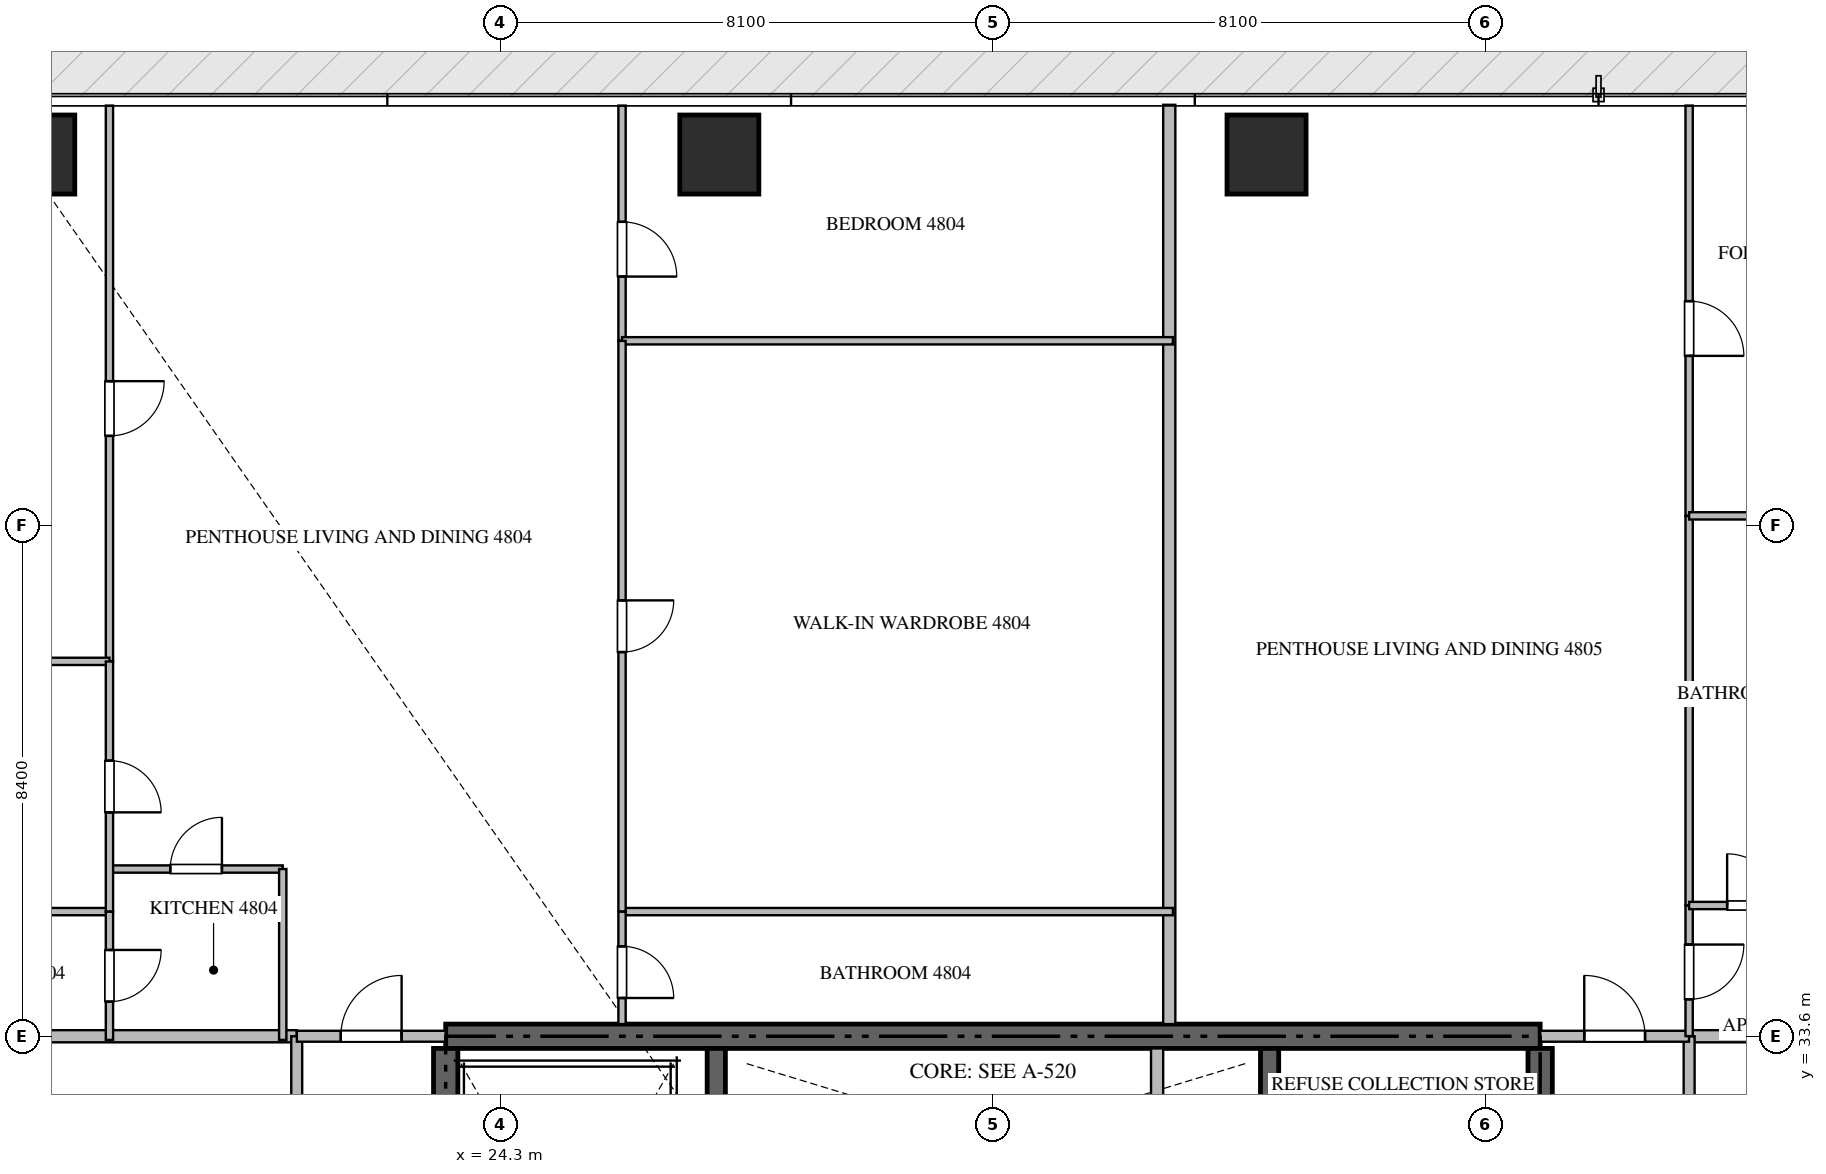
"""IFC4 building model, lengths in metres.
Left out: names, types, materials, properties, quantities, classifications, styles, units other than length and angle.
Written with IfcOpenShell. Run it as: python <this file> out.ifc"""

import sys

from ifc_helpers import new_model, si_unit, direction, frame, frame_2d, origin, origin_2d, place, context, subcontext, project, spatial, rectangle, extrude, source, transform, mapped, element, fill, save


model = new_model("IFC4")
c1 = context("Model", 3, precision=1e-05, world=origin(), true_north=direction((0.0, 1.0)))
c2 = subcontext(c1, "Body", "Model", "MODEL_VIEW")
j1 = project(units=[si_unit("LENGTHUNIT", "METRE"), si_unit("PLANEANGLEUNIT", "RADIAN")], contexts=[c1])
p1 = place(None, origin())
s1 = spatial("IfcSite", under=j1, at=p1, CompositionType="ELEMENT")
p2 = place(p1, origin())
s2 = spatial("IfcBuilding", under=s1, at=p2, CompositionType="ELEMENT")
p3 = place(p2, frame((0.0, 0.0, 191.4)))
s3 = spatial("IfcBuildingStorey", under=s2, at=p3, CompositionType="ELEMENT", Elevation=191.4)
p4 = place(p3, frame((41.4, 33.6, -0.26), z_axis=(0.0, 0.0, 1.0), x_axis=(-1.0, 0.0, 0.0)))
e1 = element("IfcWall", 1, at=p4, inside=s3, PredefinedType="SHEAR", context=c2, shape_type="SweptSolid", body=[
    extrude(rectangle(XDim=18.0, YDim=0.4, at=frame_2d((9.0, 0.0))), origin(), (0.0, 0.0, 1.0), 3.748),
])
p5 = place(p3, frame((23.4, 24.25, -0.26), z_axis=(0.0, 0.0, 1.0), x_axis=(0.0, 1.0, 0.0)))
e2 = element("IfcWall", 2, at=p5, inside=s3, PredefinedType="SHEAR", context=c2, shape_type="SweptSolid", body=[
    extrude(rectangle(XDim=9.15, YDim=0.4, at=frame_2d((4.575, 0.0))), origin(), (0.0, 0.0, 1.0), 3.748),
])
p6 = place(p3, frame((41.4, 27.75, -0.26), z_axis=(0.0, 0.0, 1.0), x_axis=(0.0, 1.0, 0.0)))
e3 = element("IfcWall", 3, at=p6, inside=s3, PredefinedType="SHEAR", context=c2, shape_type="SweptSolid", body=[
    extrude(rectangle(XDim=5.65, YDim=0.4, at=frame_2d((2.825, 0.0))), origin(), (0.0, 0.0, 1.0), 3.748),
])
p7 = place(p3, frame((27.85, 23.55, -0.26), z_axis=(0.0, 0.0, 1.0), x_axis=(0.0, 1.0, 0.0)))
e4 = element("IfcWall", 4, at=p7, inside=s3, PredefinedType="SHEAR", context=c2, shape_type="SweptSolid", body=[
    extrude(rectangle(XDim=9.85, YDim=0.3, at=frame_2d((4.925, 0.0))), origin(), (0.0, 0.0, 1.0), 3.748),
])
p8 = place(p3, frame((36.95, 27.05, -0.26), z_axis=(0.0, 0.0, 1.0), x_axis=(0.0, 1.0, 0.0)))
e5 = element("IfcWall", 5, at=p8, inside=s3, PredefinedType="SHEAR", context=c2, shape_type="SweptSolid", body=[
    extrude(rectangle(XDim=6.35, YDim=0.3, at=frame_2d((3.175, 0.0))), origin(), (0.0, 0.0, 1.0), 3.748),
])
m1 = source(origin(), c2, "Body", "SweptSolid", [
    extrude(rectangle(XDim=1.3, YDim=1.3, at=origin_2d()), origin(), (0.0, 0.0, 1.0), 3.75),
])
for number, where, z_axis, x_axis in (
    (6, (16.65, 48.1, -0.26), (0.0, 0.0, 1.0), (1.0, 0.0, 0.0)),
    (7, (27.9, 48.1, -0.26), (0.0, 0.0, 1.0), (1.0, 0.0, 0.0)),
    (8, (36.9, 48.1, -0.26), (0.0, 0.0, 1.0), (1.0, 0.0, 0.0)),
):
    element("IfcColumn", number, at=place(p3, frame(where, z_axis=z_axis, x_axis=x_axis)), inside=s3, PredefinedType="COLUMN", context=c2, shape_type="MappedRepresentation", body=[
        mapped(m1, transform((0.0, 0.0, 0.0), scale=1.0)),
    ])
p9 = place(p3, frame((35.1, 30.75, 0.0), z_axis=(0.0, 0.0, 1.0), x_axis=(0.0, 1.0, 0.0)))
e9 = element("IfcWall", 9, at=p9, inside=s3, PredefinedType="STANDARD", context=c2, shape_type="SweptSolid", body=[
    extrude(rectangle(XDim=2.65, YDim=0.2, at=frame_2d((1.325, 0.0))), origin(), (0.0, 0.0, 1.0), 3.49),
])
p10 = place(p3, frame((35.3, 33.8, 0.0), z_axis=(0.0, 0.0, 1.0), x_axis=(0.0, 1.0, 0.0)))
e10 = element("IfcWall", 10, at=p10, inside=s3, PredefinedType="PARTITIONING", context=c2, shape_type="SweptSolid", body=[
    extrude(rectangle(XDim=15.118, YDim=0.2, at=frame_2d((7.559, 0.0))), origin(), (0.0, 0.0, 1.0), 3.49),
])
for number, where, z_axis, x_axis in (
    (11, (7.882, 33.6, 0.0), (0.0, 0.0, 1.0), (1.0, 0.0, 0.0)),
    (12, (43.85, 33.6, 0.0), (0.0, 0.0, 1.0), (1.0, 0.0, 0.0)),
):
    element("IfcWall", number, at=place(p3, frame(where, z_axis=z_axis, x_axis=x_axis)), inside=s3, PredefinedType="PARTITIONING", context=c2, shape_type="SweptSolid", body=[
        extrude(rectangle(XDim=13.068, YDim=0.2, at=frame_2d((6.534, 0.0))), origin(), (0.0, 0.0, 1.0), 3.49),
    ])
p11 = place(p3, frame((20.95, 14.9, 0.0), z_axis=(0.0, 0.0, 1.0), x_axis=(0.0, 1.0, 0.0)))
e13 = element("IfcWall", 13, at=p11, inside=s3, PredefinedType="PARTITIONING", context=c2, shape_type="SweptSolid", body=[
    extrude(rectangle(XDim=18.7, YDim=0.18, at=frame_2d((9.35, 0.0))), origin(), (0.0, 0.0, 1.0), 3.49),
])
p12 = place(p11, frame((14.603, 0.0, 0.0)))
e14 = element("IfcOpeningElement", 14, at=p12, cuts=e13, PredefinedType="OPENING", context=c2, shape_type="SweptSolid", body=[
    extrude(rectangle(XDim=1.0, YDim=2.15, at=frame_2d((0.5, 1.075))), frame((0.0, 0.1, 0.0), z_axis=(0.0, -1.0, 0.0), x_axis=(1.0, 0.0, 0.0)), (0.0, 0.0, 1.0), 0.2),
])
p13 = place(p3, frame((43.85, 14.9, 0.0), z_axis=(0.0, 0.0, 1.0), x_axis=(0.0, 1.0, 0.0)))
e15 = element("IfcWall", 15, at=p13, inside=s3, PredefinedType="PARTITIONING", context=c2, shape_type="SweptSolid", body=[
    extrude(rectangle(XDim=18.7, YDim=0.18, at=frame_2d((9.35, 0.0))), origin(), (0.0, 0.0, 1.0), 3.49),
])
p14 = place(p13, frame((1.805, 0.0, 0.0)))
e16 = element("IfcOpeningElement", 16, at=p14, cuts=e15, PredefinedType="OPENING", context=c2, shape_type="SweptSolid", body=[
    extrude(rectangle(XDim=1.0, YDim=2.15, at=frame_2d((0.5, 1.075))), frame((0.0, 0.1, 0.0), z_axis=(0.0, -1.0, 0.0), x_axis=(1.0, 0.0, 0.0)), (0.0, 0.0, 1.0), 0.2),
])
p15 = place(p3, frame((20.952, 33.6, 0.0), z_axis=(0.0, 0.0, 1.0), x_axis=(1.0, 0.0, 0.0)))
e17 = element("IfcWall", 17, at=p15, inside=s3, PredefinedType="PARTITIONING", context=c2, shape_type="SweptSolid", body=[
    extrude(rectangle(XDim=2.446, YDim=0.18, at=frame_2d((1.223, 0.0))), origin(), (0.0, 0.0, 1.0), 3.49),
])
p16 = place(p15, frame((0.723, 0.0, 0.0)))
e18 = element("IfcOpeningElement", 18, at=p16, cuts=e17, PredefinedType="OPENING", context=c2, shape_type="SweptSolid", body=[
    extrude(rectangle(XDim=1.0, YDim=2.15, at=frame_2d((0.5, 1.075))), frame((0.0, 0.1, 0.0), z_axis=(0.0, -1.0, 0.0), x_axis=(1.0, 0.0, 0.0)), (0.0, 0.0, 1.0), 0.2),
])
p17 = place(p3, frame((41.402, 33.6, 0.0), z_axis=(0.0, 0.0, 1.0), x_axis=(1.0, 0.0, 0.0)))
e19 = element("IfcWall", 19, at=p17, inside=s3, PredefinedType="PARTITIONING", context=c2, shape_type="SweptSolid", body=[
    extrude(rectangle(XDim=2.446, YDim=0.18, at=frame_2d((1.223, 0.0))), origin(), (0.0, 0.0, 1.0), 3.49),
])
p18 = place(p17, frame((0.723, 0.0, 0.0)))
e20 = element("IfcOpeningElement", 20, at=p18, cuts=e19, PredefinedType="OPENING", context=c2, shape_type="SweptSolid", body=[
    extrude(rectangle(XDim=1.0, YDim=2.15, at=frame_2d((0.5, 1.075))), frame((0.0, 0.1, 0.0), z_axis=(0.0, -1.0, 0.0), x_axis=(1.0, 0.0, 0.0)), (0.0, 0.0, 1.0), 0.2),
])
p19 = place(p3, frame((17.87, 36.35, 0.0), z_axis=(0.0, 0.0, 1.0), x_axis=(1.0, 0.0, 0.0)))
e21 = element("IfcWall", 21, at=p19, inside=s3, PredefinedType="PARTITIONING", context=c2, shape_type="SweptSolid", body=[
    extrude(rectangle(XDim=2.85, YDim=0.12, at=frame_2d((1.425, 0.0))), origin(), (0.0, 0.0, 1.0), 3.49),
])
p20 = place(p19, frame((1.0, 0.0, 0.0)))
e22 = element("IfcOpeningElement", 22, at=p20, cuts=e21, PredefinedType="OPENING", context=c2, shape_type="SweptSolid", body=[
    extrude(rectangle(XDim=0.85, YDim=2.1, at=frame_2d((0.425, 1.05))), frame((0.0, 0.07, 0.0), z_axis=(0.0, -1.0, 0.0), x_axis=(1.0, 0.0, 0.0)), (0.0, 0.0, 1.0), 0.14),
])
p21 = place(p3, frame((20.72, 36.35, 0.0), z_axis=(0.0, 0.0, 1.0), x_axis=(0.0, -1.0, 0.0)))
e23 = element("IfcWall", 23, at=p21, inside=s3, PredefinedType="PARTITIONING", context=c2, shape_type="SweptSolid", body=[
    extrude(rectangle(XDim=2.81, YDim=0.12, at=frame_2d((1.405, 0.0))), origin(), (0.0, 0.0, 1.0), 3.49),
])
p22 = place(p3, frame((17.87, 48.905, 0.0), z_axis=(0.0, 0.0, 1.0), x_axis=(0.0, -1.0, 0.0)))
e24 = element("IfcWall", 24, at=p22, inside=s3, PredefinedType="PARTITIONING", context=c2, shape_type="SweptSolid", body=[
    extrude(rectangle(XDim=9.14, YDim=0.12, at=frame_2d((4.57, 0.0))), origin(), (0.0, 0.0, 1.0), 3.49),
])
p23 = place(p22, frame((4.532, 0.0, 0.0)))
e25 = element("IfcOpeningElement", 25, at=p23, cuts=e24, PredefinedType="OPENING", context=c2, shape_type="SweptSolid", body=[
    extrude(rectangle(XDim=0.9, YDim=2.1, at=frame_2d((0.45, 1.05))), frame((0.0, 0.07, 0.0), z_axis=(0.0, -1.0, 0.0), x_axis=(1.0, 0.0, 0.0)), (0.0, 0.0, 1.0), 0.14),
])
p24 = place(p3, frame((7.895, 39.765, 0.0), z_axis=(0.0, 0.0, 1.0), x_axis=(1.0, 0.0, 0.0)))
e26 = element("IfcWall", 26, at=p24, inside=s3, PredefinedType="PARTITIONING", context=c2, shape_type="SweptSolid", body=[
    extrude(rectangle(XDim=9.975, YDim=0.12, at=frame_2d((4.988, 0.0))), origin(), (0.0, 0.0, 1.0), 3.49),
])
p25 = place(p3, frame((14.67, 35.65, 0.0), z_axis=(0.0, 0.0, 1.0), x_axis=(1.0, 0.0, 0.0)))
e27 = element("IfcWall", 27, at=p25, inside=s3, PredefinedType="PARTITIONING", context=c2, shape_type="SweptSolid", body=[
    extrude(rectangle(XDim=3.2, YDim=0.12, at=frame_2d((1.6, 0.0))), origin(), (0.0, 0.0, 1.0), 3.49),
])
p26 = place(p3, frame((17.87, 39.763, 0.0), z_axis=(0.0, 0.0, 1.0), x_axis=(0.0, -1.0, 0.0)))
e28 = element("IfcWall", 28, at=p26, inside=s3, PredefinedType="PARTITIONING", context=c2, shape_type="SweptSolid", body=[
    extrude(rectangle(XDim=4.113, YDim=0.12, at=frame_2d((2.057, 0.0))), origin(), (0.0, 0.0, 1.0), 3.49),
])
p27 = place(p26, frame((1.631, 0.0, 0.0)))
e29 = element("IfcOpeningElement", 29, at=p27, cuts=e28, PredefinedType="OPENING", context=c2, shape_type="SweptSolid", body=[
    extrude(rectangle(XDim=0.85, YDim=2.1, at=frame_2d((0.425, 1.05))), frame((0.0, 0.07, 0.0), z_axis=(0.0, -1.0, 0.0), x_axis=(1.0, 0.0, 0.0)), (0.0, 0.0, 1.0), 0.14),
])
p28 = place(p3, frame((17.87, 35.648, 0.0), z_axis=(0.0, 0.0, 1.0), x_axis=(0.0, -1.0, 0.0)))
e30 = element("IfcWall", 30, at=p28, inside=s3, PredefinedType="PARTITIONING", context=c2, shape_type="SweptSolid", body=[
    extrude(rectangle(XDim=2.108, YDim=0.12, at=frame_2d((1.054, 0.0))), origin(), (0.0, 0.0, 1.0), 3.49),
])
p29 = place(p28, frame((0.629, 0.0, 0.0)))
e31 = element("IfcOpeningElement", 31, at=p29, cuts=e30, PredefinedType="OPENING", context=c2, shape_type="SweptSolid", body=[
    extrude(rectangle(XDim=0.85, YDim=2.1, at=frame_2d((0.425, 1.05))), frame((0.0, 0.07, 0.0), z_axis=(0.0, -1.0, 0.0), x_axis=(1.0, 0.0, 0.0)), (0.0, 0.0, 1.0), 0.14),
])
p30 = place(p3, frame((26.3, 48.905, 0.0), z_axis=(0.0, 0.0, 1.0), x_axis=(0.0, -1.0, 0.0)))
e32 = element("IfcWall", 32, at=p30, inside=s3, PredefinedType="PARTITIONING", context=c2, shape_type="SweptSolid", body=[
    extrude(rectangle(XDim=3.868, YDim=0.12, at=frame_2d((1.934, 0.0))), origin(), (0.0, 0.0, 1.0), 3.49),
])
p31 = place(p30, frame((1.912, 0.0, 0.0)))
e33 = element("IfcOpeningElement", 33, at=p31, cuts=e32, PredefinedType="OPENING", context=c2, shape_type="SweptSolid", body=[
    extrude(rectangle(XDim=0.9, YDim=2.1, at=frame_2d((0.45, 1.05))), frame((0.0, 0.07, 0.0), z_axis=(0.0, -1.0, 0.0), x_axis=(1.0, 0.0, 0.0)), (0.0, 0.0, 1.0), 0.14),
])
for number, where, z_axis, x_axis in (
    (34, (26.3, 45.037, 0.0), (0.0, 0.0, 1.0), (1.0, 0.0, 0.0)),
    (35, (26.3, 35.65, 0.0), (0.0, 0.0, 1.0), (1.0, 0.0, 0.0)),
):
    element("IfcWall", number, at=place(p3, frame(where, z_axis=z_axis, x_axis=x_axis)), inside=s3, PredefinedType="PARTITIONING", context=c2, shape_type="SweptSolid", body=[
        extrude(rectangle(XDim=9.06, YDim=0.12, at=frame_2d((4.53, 0.0))), origin(), (0.0, 0.0, 1.0), 3.49),
    ])
p32 = place(p3, frame((26.3, 45.035, 0.0), z_axis=(0.0, 0.0, 1.0), x_axis=(0.0, -1.0, 0.0)))
e36 = element("IfcWall", 36, at=p32, inside=s3, PredefinedType="PARTITIONING", context=c2, shape_type="SweptSolid", body=[
    extrude(rectangle(XDim=9.385, YDim=0.12, at=frame_2d((4.692, 0.0))), origin(), (0.0, 0.0, 1.0), 3.49),
])
p33 = place(p32, frame((4.267, 0.0, 0.0)))
e37 = element("IfcOpeningElement", 37, at=p33, cuts=e36, PredefinedType="OPENING", context=c2, shape_type="SweptSolid", body=[
    extrude(rectangle(XDim=0.85, YDim=2.1, at=frame_2d((0.425, 1.05))), frame((0.0, 0.07, 0.0), z_axis=(0.0, -1.0, 0.0), x_axis=(1.0, 0.0, 0.0)), (0.0, 0.0, 1.0), 0.14),
])
p34 = place(p3, frame((26.3, 35.648, 0.0), z_axis=(0.0, 0.0, 1.0), x_axis=(0.0, -1.0, 0.0)))
e38 = element("IfcWall", 38, at=p34, inside=s3, PredefinedType="PARTITIONING", context=c2, shape_type="SweptSolid", body=[
    extrude(rectangle(XDim=1.848, YDim=0.12, at=frame_2d((0.924, 0.0))), origin(), (0.0, 0.0, 1.0), 3.49),
])
p35 = place(p34, frame((0.569, 0.0, 0.0)))
e39 = element("IfcOpeningElement", 39, at=p35, cuts=e38, PredefinedType="OPENING", context=c2, shape_type="SweptSolid", body=[
    extrude(rectangle(XDim=0.85, YDim=2.1, at=frame_2d((0.425, 1.05))), frame((0.0, 0.07, 0.0), z_axis=(0.0, -1.0, 0.0), x_axis=(1.0, 0.0, 0.0)), (0.0, 0.0, 1.0), 0.14),
])
p36 = place(p3, frame((43.85, 35.75, 0.0), z_axis=(0.0, 0.0, 1.0), x_axis=(0.0, -1.0, 0.0)))
e40 = element("IfcWall", 40, at=p36, inside=s3, PredefinedType="PARTITIONING", context=c2, shape_type="SweptSolid", body=[
    extrude(rectangle(XDim=2.148, YDim=0.12, at=frame_2d((1.074, 0.0))), origin(), (0.0, 0.0, 1.0), 3.49),
])
p37 = place(p36, frame((0.642, 0.0, 0.0)))
e41 = element("IfcOpeningElement", 41, at=p37, cuts=e40, PredefinedType="OPENING", context=c2, shape_type="SweptSolid", body=[
    extrude(rectangle(XDim=0.9, YDim=2.1, at=frame_2d((0.45, 1.05))), frame((0.0, 0.07, 0.0), z_axis=(0.0, -1.0, 0.0), x_axis=(1.0, 0.0, 0.0)), (0.0, 0.0, 1.0), 0.14),
])
p38 = place(p3, frame((43.85, 48.905, 0.0), z_axis=(0.0, 0.0, 1.0), x_axis=(0.0, -1.0, 0.0)))
e42 = element("IfcWall", 42, at=p38, inside=s3, PredefinedType="PARTITIONING", context=c2, shape_type="SweptSolid", body=[
    extrude(rectangle(XDim=6.747, YDim=0.12, at=frame_2d((3.374, 0.0))), origin(), (0.0, 0.0, 1.0), 3.49),
])
p39 = place(p38, frame((3.216, 0.0, 0.0)))
e43 = element("IfcOpeningElement", 43, at=p39, cuts=e42, PredefinedType="OPENING", context=c2, shape_type="SweptSolid", body=[
    extrude(rectangle(XDim=0.9, YDim=2.1, at=frame_2d((0.45, 1.05))), frame((0.0, 0.07, 0.0), z_axis=(0.0, -1.0, 0.0), x_axis=(1.0, 0.0, 0.0)), (0.0, 0.0, 1.0), 0.14),
])
p40 = place(p3, frame((43.85, 42.156, 0.0), z_axis=(0.0, 0.0, 1.0), x_axis=(0.0, -1.0, 0.0)))
e44 = element("IfcWall", 44, at=p40, inside=s3, PredefinedType="PARTITIONING", context=c2, shape_type="SweptSolid", body=[
    extrude(rectangle(XDim=6.404, YDim=0.12, at=frame_2d((3.202, 0.0))), origin(), (0.0, 0.0, 1.0), 3.49),
])
p41 = place(p3, frame((43.85, 42.158, 0.0), z_axis=(0.0, 0.0, 1.0), x_axis=(1.0, 0.0, 0.0)))
e45 = element("IfcWall", 45, at=p41, inside=s3, PredefinedType="PARTITIONING", context=c2, shape_type="SweptSolid", body=[
    extrude(rectangle(XDim=5.6, YDim=0.12, at=frame_2d((2.8, 0.0))), origin(), (0.0, 0.0, 1.0), 3.49),
])
p42 = place(p3, frame((43.85, 35.75, 0.0), z_axis=(0.0, 0.0, 1.0), x_axis=(1.0, 0.0, 0.0)))
e46 = element("IfcWall", 46, at=p42, inside=s3, PredefinedType="PARTITIONING", context=c2, shape_type="SweptSolid", body=[
    extrude(rectangle(XDim=2.1, YDim=0.12, at=frame_2d((1.05, 0.0))), origin(), (0.0, 0.0, 1.0), 3.49),
])
p43 = place(p42, frame((0.625, 0.0, 0.0)))
e47 = element("IfcOpeningElement", 47, at=p43, cuts=e46, PredefinedType="OPENING", context=c2, shape_type="SweptSolid", body=[
    extrude(rectangle(XDim=0.85, YDim=2.1, at=frame_2d((0.425, 1.05))), frame((0.0, 0.07, 0.0), z_axis=(0.0, -1.0, 0.0), x_axis=(1.0, 0.0, 0.0)), (0.0, 0.0, 1.0), 0.14),
])
m2 = source(origin(), c2, "Body", "SweptSolid", [
    extrude(rectangle(XDim=1.0, YDim=2.15, at=frame_2d((0.5, 1.075))), frame((0.0, 0.025, 0.0), z_axis=(0.0, -1.0, 0.0), x_axis=(1.0, 0.0, 0.0)), (0.0, 0.0, 1.0), 0.05),
])
p44 = place(p16, origin())
e48 = element("IfcDoor", 48, at=p44, inside=s3, OperationType="SINGLE_SWING_RIGHT", PredefinedType="DOOR", context=c2, shape_type="MappedRepresentation", body=[
    mapped(m2, transform((0.0, 0.0, 0.0), scale=1.0)),
])
fill(e18, e48)
p45 = place(p18, origin())
e49 = element("IfcDoor", 49, at=p45, inside=s3, OperationType="SINGLE_SWING_LEFT", PredefinedType="DOOR", context=c2, shape_type="MappedRepresentation", body=[
    mapped(m2, transform((0.0, 0.0, 0.0), scale=1.0)),
])
fill(e20, e49)
m3 = source(origin(), c2, "Body", "SweptSolid", [
    extrude(rectangle(XDim=0.85, YDim=2.1, at=frame_2d((0.425, 1.05))), frame((0.0, 0.025, 0.0), z_axis=(0.0, -1.0, 0.0), x_axis=(1.0, 0.0, 0.0)), (0.0, 0.0, 1.0), 0.05),
])
p46 = place(p20, origin())
e50 = element("IfcDoor", 50, at=p46, inside=s3, OperationType="SINGLE_SWING_RIGHT", PredefinedType="DOOR", context=c2, shape_type="MappedRepresentation", body=[
    mapped(m3, transform((0.0, 0.0, 0.0), scale=1.0)),
])
fill(e22, e50)
m4 = source(origin(), c2, "Body", "SweptSolid", [
    extrude(rectangle(XDim=0.9, YDim=2.1, at=frame_2d((0.45, 1.05))), frame((0.0, 0.025, 0.0), z_axis=(0.0, -1.0, 0.0), x_axis=(1.0, 0.0, 0.0)), (0.0, 0.0, 1.0), 0.05),
])
p47 = place(p23, origin())
e51 = element("IfcDoor", 51, at=p47, inside=s3, OperationType="SINGLE_SWING_LEFT", PredefinedType="DOOR", context=c2, shape_type="MappedRepresentation", body=[
    mapped(m4, transform((0.0, 0.0, 0.0), scale=1.0)),
])
fill(e25, e51)
p48 = place(p27, origin())
e52 = element("IfcDoor", 52, at=p48, inside=s3, OperationType="SINGLE_SWING_RIGHT", PredefinedType="DOOR", context=c2, shape_type="MappedRepresentation", body=[
    mapped(m3, transform((0.0, 0.0, 0.0), scale=1.0)),
])
fill(e29, e52)
p49 = place(p29, origin())
e53 = element("IfcDoor", 53, at=p49, inside=s3, OperationType="SINGLE_SWING_LEFT", PredefinedType="DOOR", context=c2, shape_type="MappedRepresentation", body=[
    mapped(m3, transform((0.0, 0.0, 0.0), scale=1.0)),
])
fill(e31, e53)
p50 = place(p31, origin())
e54 = element("IfcDoor", 54, at=p50, inside=s3, OperationType="SINGLE_SWING_RIGHT", PredefinedType="DOOR", context=c2, shape_type="MappedRepresentation", body=[
    mapped(m4, transform((0.0, 0.0, 0.0), scale=1.0)),
])
fill(e33, e54)
p51 = place(p33, origin())
e55 = element("IfcDoor", 55, at=p51, inside=s3, OperationType="SINGLE_SWING_LEFT", PredefinedType="DOOR", context=c2, shape_type="MappedRepresentation", body=[
    mapped(m3, transform((0.0, 0.0, 0.0), scale=1.0)),
])
fill(e37, e55)
p52 = place(p35, origin())
e56 = element("IfcDoor", 56, at=p52, inside=s3, OperationType="SINGLE_SWING_RIGHT", PredefinedType="DOOR", context=c2, shape_type="MappedRepresentation", body=[
    mapped(m3, transform((0.0, 0.0, 0.0), scale=1.0)),
])
fill(e39, e56)
p53 = place(p37, origin())
e57 = element("IfcDoor", 57, at=p53, inside=s3, OperationType="SINGLE_SWING_LEFT", PredefinedType="DOOR", context=c2, shape_type="MappedRepresentation", body=[
    mapped(m4, transform((0.0, 0.0, 0.0), scale=1.0)),
])
fill(e41, e57)
p54 = place(p39, origin())
e58 = element("IfcDoor", 58, at=p54, inside=s3, OperationType="SINGLE_SWING_RIGHT", PredefinedType="DOOR", context=c2, shape_type="MappedRepresentation", body=[
    mapped(m4, transform((0.0, 0.0, 0.0), scale=1.0)),
])
fill(e43, e58)
p55 = place(p43, origin())
e59 = element("IfcDoor", 59, at=p55, inside=s3, OperationType="SINGLE_SWING_LEFT", PredefinedType="DOOR", context=c2, shape_type="MappedRepresentation", body=[
    mapped(m3, transform((0.0, 0.0, 0.0), scale=1.0)),
])
fill(e47, e59)
save(model, sys.argv[1])
